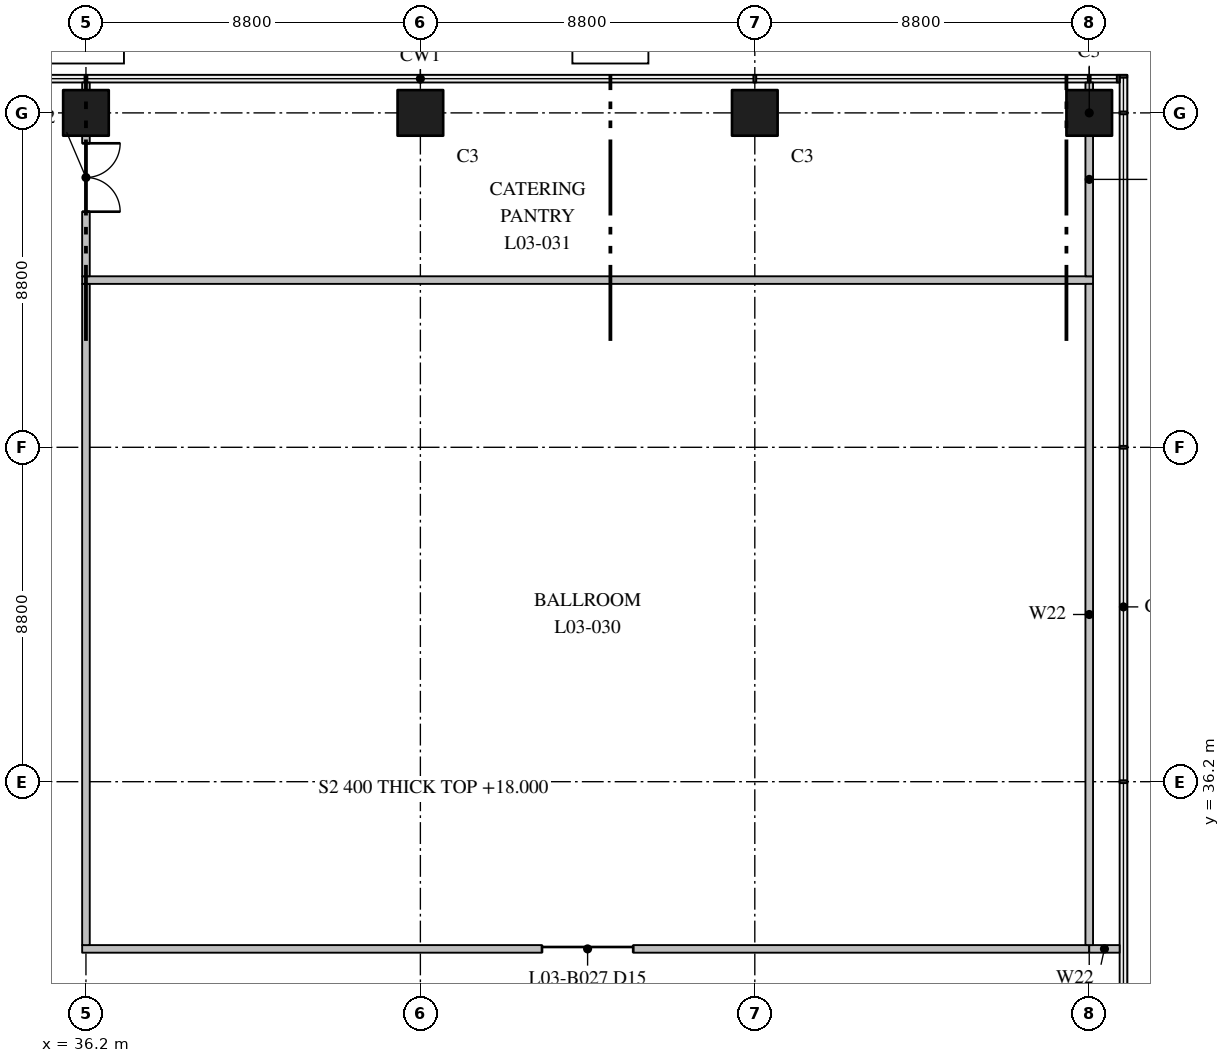
"""IFC4 building model, lengths in metres.
Left out: names, types, materials, properties, quantities, classifications, styles, units other than length and angle.
Written with IfcOpenShell. Run it as: python <this file> out.ifc"""

import sys

from ifc_helpers import new_model, si_unit, direction, frame, frame_2d, origin, origin_2d, place, context, subcontext, project, spatial, rectangle, extrude, element, fill, save


model = new_model("IFC4")
c1 = context("Model", 3, precision=1e-05, world=origin(), true_north=direction((0.0, 1.0)))
c2 = subcontext(c1, "Body", "Model", "MODEL_VIEW")
j1 = project(units=[si_unit("LENGTHUNIT", "METRE"), si_unit("PLANEANGLEUNIT", "RADIAN")], contexts=[c1])
p1 = place(None, origin())
s1 = spatial("IfcSite", under=j1, at=p1, CompositionType="ELEMENT")
p2 = place(p1, origin())
s2 = spatial("IfcBuilding", under=s1, at=p2, CompositionType="ELEMENT")
p3 = place(p2, frame((0.0, 0.0, 18.0)))
s3 = spatial("IfcBuildingStorey", under=s2, at=p3, CompositionType="ELEMENT", Elevation=18.0)
for number, where, z_axis, x_axis in (
    (1, (36.2, 53.8, 0.0), (0.0, 0.0, 1.0), (1.0, 0.0, 0.0)),
    (2, (45.0, 53.8, 0.0), (0.0, 0.0, 1.0), (1.0, 0.0, 0.0)),
    (3, (53.8, 53.8, 0.0), (0.0, 0.0, 1.0), (1.0, 0.0, 0.0)),
    (4, (62.6, 53.8, 0.0), (0.0, 0.0, 1.0), (1.0, 0.0, 0.0)),
):
    element("IfcColumn", number, at=place(p3, frame(where, z_axis=z_axis, x_axis=x_axis)), inside=s3, PredefinedType="COLUMN", context=c2, shape_type="SweptSolid", body=[
        extrude(rectangle(XDim=1.2, YDim=1.2, at=origin_2d()), origin(), (0.0, 0.0, 1.0), 5.5),
    ])
p4 = place(p3, frame((36.1, 31.8, 0.0), z_axis=(0.0, 0.0, 1.0), x_axis=(1.0, 0.0, 0.0)))
e5 = element("IfcWall", 5, at=p4, inside=s3, PredefinedType="PARTITIONING", context=c2, shape_type="SweptSolid", body=[
    extrude(rectangle(XDim=26.5, YDim=0.2, at=frame_2d((13.25, 0.0))), origin(), (0.0, 0.0, 1.0), 8.0),
])
p5 = place(p4, frame((12.1, 0.0, 0.0)))
e6 = element("IfcOpeningElement", 6, at=p5, cuts=e5, PredefinedType="OPENING", context=c2, shape_type="SweptSolid", body=[
    extrude(rectangle(XDim=2.4, YDim=2.4, at=frame_2d((1.2, 1.2))), frame((0.0, 0.11, 0.0), z_axis=(0.0, -1.0, 0.0), x_axis=(1.0, 0.0, 0.0)), (0.0, 0.0, 1.0), 0.22),
])
p6 = place(p3, frame((62.6, 31.8, 0.0), z_axis=(0.0, 0.0, 1.0), x_axis=(1.0, 0.0, 0.0)))
e7 = element("IfcWall", 7, at=p6, inside=s3, PredefinedType="PARTITIONING", context=c2, shape_type="SweptSolid", body=[
    extrude(rectangle(XDim=0.8, YDim=0.2, at=frame_2d((0.4, 0.0))), origin(), (0.0, 0.0, 1.0), 5.1),
])
p7 = place(p3, frame((36.1, 49.4, 0.0), z_axis=(0.0, 0.0, 1.0), x_axis=(1.0, 0.0, 0.0)))
e8 = element("IfcWall", 8, at=p7, inside=s3, PredefinedType="PARTITIONING", context=c2, shape_type="SweptSolid", body=[
    extrude(rectangle(XDim=26.6, YDim=0.2, at=frame_2d((13.3, 0.0))), origin(), (0.0, 0.0, 1.0), 8.0),
])
p8 = place(p3, frame((36.2, 31.9, 0.0), z_axis=(0.0, 0.0, 1.0), x_axis=(0.0, 1.0, 0.0)))
e9 = element("IfcWall", 9, at=p8, inside=s3, PredefinedType="PARTITIONING", context=c2, shape_type="SweptSolid", body=[
    extrude(rectangle(XDim=17.4, YDim=0.2, at=frame_2d((8.7, 0.0))), origin(), (0.0, 0.0, 1.0), 8.0),
])
p9 = place(p3, frame((36.2, 49.5, 0.0), z_axis=(0.0, 0.0, 1.0), x_axis=(0.0, 1.0, 0.0)))
e10 = element("IfcWall", 10, at=p9, inside=s3, PredefinedType="PARTITIONING", context=c2, shape_type="SweptSolid", body=[
    extrude(rectangle(XDim=5.1, YDim=0.2, at=frame_2d((2.55, 0.0))), origin(), (0.0, 0.0, 1.0), 5.1),
])
p10 = place(p9, frame((1.7, 0.0, 0.0)))
e11 = element("IfcOpeningElement", 11, at=p10, cuts=e10, PredefinedType="OPENING", context=c2, shape_type="SweptSolid", body=[
    extrude(rectangle(XDim=1.8, YDim=2.1, at=frame_2d((0.9, 1.05))), frame((0.0, 0.11, 0.0), z_axis=(0.0, -1.0, 0.0), x_axis=(1.0, 0.0, 0.0)), (0.0, 0.0, 1.0), 0.22),
])
p11 = place(p3, frame((62.6, 31.9, 0.0), z_axis=(0.0, 0.0, 1.0), x_axis=(0.0, 1.0, 0.0)))
e12 = element("IfcWall", 12, at=p11, inside=s3, PredefinedType="PARTITIONING", context=c2, shape_type="SweptSolid", body=[
    extrude(rectangle(XDim=17.4, YDim=0.2, at=frame_2d((8.7, 0.0))), origin(), (0.0, 0.0, 1.0), 8.0),
])
p12 = place(p3, frame((62.6, 49.5, 0.0), z_axis=(0.0, 0.0, 1.0), x_axis=(0.0, 1.0, 0.0)))
e13 = element("IfcWall", 13, at=p12, inside=s3, PredefinedType="PARTITIONING", context=c2, shape_type="SweptSolid", body=[
    extrude(rectangle(XDim=5.1, YDim=0.2, at=frame_2d((2.55, 0.0))), origin(), (0.0, 0.0, 1.0), 5.1),
])
p13 = place(p5, origin())
e14 = element("IfcDoor", 14, at=p13, inside=s3, OperationType="DOUBLE_DOOR_SLIDING", PredefinedType="DOOR", context=c2, shape_type="SweptSolid", body=[
    extrude(rectangle(XDim=2.4, YDim=2.4, at=frame_2d((1.2, 1.2))), frame((0.0, 0.025, 0.0), z_axis=(0.0, -1.0, 0.0), x_axis=(1.0, 0.0, 0.0)), (0.0, 0.0, 1.0), 0.05),
])
fill(e6, e14)
p14 = place(p10, frame((1.8, 0.0, 0.0), z_axis=(0.0, 0.0, 1.0), x_axis=(-1.0, 0.0, 0.0)))
e15 = element("IfcDoor", 15, at=p14, inside=s3, OperationType="DOUBLE_DOOR_SINGLE_SWING", PredefinedType="DOOR", context=c2, shape_type="SweptSolid", body=[
    extrude(rectangle(XDim=1.8, YDim=2.1, at=frame_2d((0.9, 1.05))), frame((0.0, 0.025, 0.0), z_axis=(0.0, -1.0, 0.0), x_axis=(1.0, 0.0, 0.0)), (0.0, 0.0, 1.0), 0.05),
])
fill(e11, e15)
save(model, sys.argv[1])
